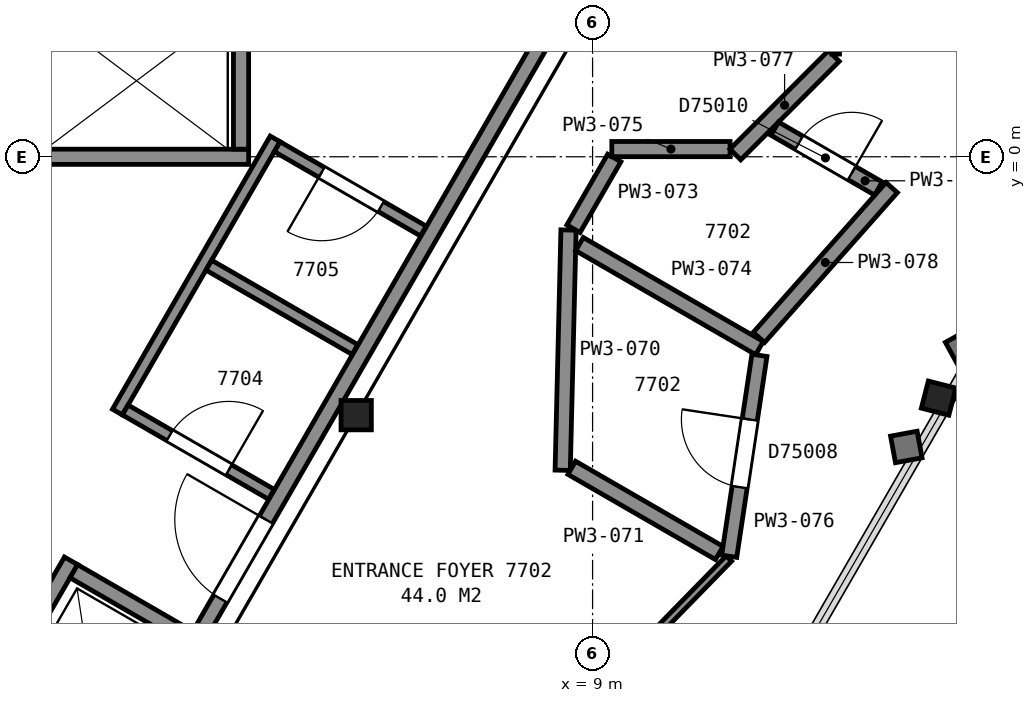
"""IFC4 building model, lengths in metres.
Left out: names, types, materials, properties, quantities, classifications, styles, units other than length and angle.
Written with IfcOpenShell. Run it as: python <this file> out.ifc"""

import sys

from ifc_helpers import new_model, si_unit, direction, frame, frame_2d, origin, origin_2d, place, context, subcontext, project, spatial, rectangle, i_section, extrude, element, fill, save


model = new_model("IFC4")
c1 = context("Model", 3, precision=1e-05, world=origin(), true_north=direction((0.0, 1.0)))
c2 = subcontext(c1, "Body", "Model", "MODEL_VIEW")
j1 = project(units=[si_unit("LENGTHUNIT", "METRE"), si_unit("PLANEANGLEUNIT", "RADIAN")], contexts=[c1])
p1 = place(None, origin())
s1 = spatial("IfcSite", under=j1, at=p1, CompositionType="ELEMENT")
p2 = place(p1, origin())
s2 = spatial("IfcBuilding", under=s1, at=p2, CompositionType="ELEMENT")
p3 = place(p2, frame((0.0, 0.0, 304.7)))
s3 = spatial("IfcBuildingStorey", under=s2, at=p3, CompositionType="ELEMENT", Elevation=304.7)
p4 = place(p3, frame((13.868, -3.257, 0.045), z_axis=(-0.262724220884, 0.067633911174, 0.96249760406), x_axis=(-0.498583237787, -0.86355528035, -0.075412417924)))
e1 = element("IfcColumn", 1, at=p4, inside=s3, PredefinedType="COLUMN", context=c2, shape_type="SweptSolid", body=[
    extrude(i_section(OverallWidth=0.373, OverallDepth=0.368, WebThickness=0.015, FlangeThickness=0.024, FilletRadius=0.015, at=origin_2d()), origin(), (0.0, 0.0, 1.0), 3.75),
])
p5 = place(p3, frame((5.89, -3.4, 0.0), z_axis=(0.0, 0.0, 1.0), x_axis=(1.0, 0.0, 0.0)))
e2 = element("IfcColumn", 2, at=p5, inside=s3, PredefinedType="COLUMN", context=c2, shape_type="SweptSolid", body=[
    extrude(i_section(OverallWidth=0.399, OverallDepth=0.386, WebThickness=0.021, FlangeThickness=0.033, FilletRadius=0.015, at=origin_2d()), origin(), (0.0, 0.0, 1.0), 3.7),
])
p6 = place(p3, frame((1.525, 0.0, 0.0), z_axis=(0.0, 0.0, 1.0), x_axis=(1.0, 0.0, 0.0)))
e3 = element("IfcWall", 3, at=p6, inside=s3, PredefinedType="PARTITIONING", context=c2, shape_type="SweptSolid", body=[
    extrude(rectangle(XDim=2.95, YDim=0.2, at=frame_2d((1.475, 0.0))), origin(), (0.0, 0.0, 1.0), 3.7),
])
p7 = place(p3, frame((0.863, -7.525, 0.0), z_axis=(0.0, 0.0, 1.0), x_axis=(0.499990435942, 0.866030925526, 0.0)))
e4 = element("IfcWall", 4, at=p7, inside=s3, PredefinedType="PARTITIONING", context=c2, shape_type="SweptSolid", body=[
    extrude(rectangle(XDim=2.55, YDim=0.2, at=frame_2d((1.275, 0.0))), origin(), (0.0, 0.0, 1.0), 3.7),
])
p8 = place(p7, frame((0.725, 0.0, 0.0)))
e5 = element("IfcOpeningElement", 5, at=p8, cuts=e4, PredefinedType="OPENING", context=c2, shape_type="SweptSolid", body=[
    extrude(rectangle(XDim=1.1, YDim=2.1, at=frame_2d((0.55, 1.05))), frame((0.0, 0.11, 0.0), z_axis=(0.0, -1.0, 0.0), x_axis=(1.0, 0.0, 0.0)), (0.0, 0.0, 1.0), 0.22),
])
p9 = place(p3, frame((4.375, 0.1, 0.0), z_axis=(0.0, 0.0, 1.0), x_axis=(0.0, 1.0, 0.0)))
e6 = element("IfcWall", 6, at=p9, inside=s3, PredefinedType="PARTITIONING", context=c2, shape_type="SweptSolid", body=[
    extrude(rectangle(XDim=1.95, YDim=0.2, at=frame_2d((0.975, 0.0))), origin(), (0.0, 0.0, 1.0), 3.7),
])
p10 = place(p3, frame((3.69, -6.328, 0.0), z_axis=(0.0, 0.0, 1.0), x_axis=(-0.866036909293, 0.499980071345, 0.0)))
e7 = element("IfcWall", 7, at=p10, inside=s3, PredefinedType="PARTITIONING", context=c2, shape_type="SweptSolid", body=[
    extrude(rectangle(XDim=1.75, YDim=0.2, at=frame_2d((0.875, 0.0))), origin(), (0.0, 0.0, 1.0), 3.7),
])
p11 = place(p3, frame((2.749, -3.359, 0.0), z_axis=(0.0, 0.0, 1.0), x_axis=(0.500017827812, 0.866015110648, 0.0)))
e8 = element("IfcWall", 8, at=p11, inside=s3, PredefinedType="PARTITIONING", context=c2, shape_type="SweptSolid", body=[
    extrude(rectangle(XDim=4.15, YDim=0.15, at=frame_2d((2.075, 0.0))), origin(), (0.0, 0.0, 1.0), 3.45),
])
p12 = place(p3, frame((2.851, -3.332, 0.0), z_axis=(0.0, 0.0, 1.0), x_axis=(0.866110524189, -0.499852538144, 0.0)))
e9 = element("IfcWall", 9, at=p12, inside=s3, PredefinedType="PARTITIONING", context=c2, shape_type="SweptSolid", body=[
    extrude(rectangle(XDim=2.22, YDim=0.15, at=frame_2d((1.11, 0.0))), origin(), (0.0, 0.0, 1.0), 3.45),
])
p13 = place(p12, frame((0.675, 0.0, 0.0)))
e10 = element("IfcOpeningElement", 10, at=p13, cuts=e9, PredefinedType="OPENING", context=c2, shape_type="SweptSolid", body=[
    extrude(rectangle(XDim=0.9, YDim=2.1, at=frame_2d((0.45, 1.05))), frame((0.0, 0.085, 0.0), z_axis=(0.0, -1.0, 0.0), x_axis=(1.0, 0.0, 0.0)), (0.0, 0.0, 1.0), 0.17),
])
p14 = place(p3, frame((3.828, -6.29, 0.0), z_axis=(0.0, 0.0, 1.0), x_axis=(0.499979739078, 0.866037101117, 0.0)))
e11 = element("IfcWall", 11, at=p14, inside=s3, PredefinedType="PARTITIONING", context=c2, shape_type="SweptSolid", body=[
    extrude(rectangle(XDim=11.363, YDim=0.2, at=frame_2d((5.681, 0.0))), origin(), (0.0, 0.0, 1.0), 3.45),
])
p15 = place(p14, frame((0.55, 0.0, 0.0)))
e12 = element("IfcOpeningElement", 12, at=p15, cuts=e11, PredefinedType="OPENING", context=c2, shape_type="SweptSolid", body=[
    extrude(rectangle(XDim=1.2, YDim=2.1, at=frame_2d((0.6, 1.05))), frame((0.0, 0.11, 0.0), z_axis=(0.0, -1.0, 0.0), x_axis=(1.0, 0.0, 0.0)), (0.0, 0.0, 1.0), 0.22),
])
p16 = place(p3, frame((3.951, -1.427, 0.0), z_axis=(0.0, 0.0, 1.0), x_axis=(0.866062920605, -0.499935013329, 0.0)))
e13 = element("IfcWall", 13, at=p16, inside=s3, PredefinedType="PARTITIONING", context=c2, shape_type="SweptSolid", body=[
    extrude(rectangle(XDim=2.22, YDim=0.15, at=frame_2d((1.11, 0.0))), origin(), (0.0, 0.0, 1.0), 3.45),
])
p17 = place(p3, frame((6.774, -0.978, 0.0), z_axis=(0.0, 0.0, 1.0), x_axis=(-0.866062920605, 0.499935013329, 0.0)))
e14 = element("IfcWall", 14, at=p17, inside=s3, PredefinedType="PARTITIONING", context=c2, shape_type="SweptSolid", body=[
    extrude(rectangle(XDim=2.22, YDim=0.15, at=frame_2d((1.11, 0.0))), origin(), (0.0, 0.0, 1.0), 3.45),
])
p18 = place(p17, frame((0.646, 0.0, 0.0)))
e15 = element("IfcOpeningElement", 15, at=p18, cuts=e14, PredefinedType="OPENING", context=c2, shape_type="SweptSolid", body=[
    extrude(rectangle(XDim=0.9, YDim=2.1, at=frame_2d((0.45, 1.05))), frame((0.0, 0.085, 0.0), z_axis=(0.0, -1.0, 0.0), x_axis=(1.0, 0.0, 0.0)), (0.0, 0.0, 1.0), 0.17),
])
p19 = place(p3, frame((7.682, -8.47, 0.0), z_axis=(0.0, 0.0, 1.0), x_axis=(0.698777378461, 0.715339203002, 0.0)))
e16 = element("IfcWall", 16, at=p19, inside=s3, PredefinedType="PARTITIONING", context=c2, shape_type="SweptSolid", body=[
    extrude(rectangle(XDim=4.452, YDim=0.1, at=frame_2d((2.226, 0.0))), origin(), (0.0, 0.0, 1.0), 2.723),
])
p20 = place(p3, frame((8.607, -4.125, 0.0), z_axis=(0.0, 0.0, 1.0), x_axis=(0.024245593124, 0.999706032399, 0.0)))
e17 = element("IfcWall", 17, at=p20, inside=s3, PredefinedType="PARTITIONING", context=c2, shape_type="SweptSolid", body=[
    extrude(rectangle(XDim=3.162, YDim=0.2, at=frame_2d((1.581, 0.0))), origin(), (0.0, 0.0, 1.0), 2.723),
])
p21 = place(p3, frame((8.726, -4.093, 0.0), z_axis=(0.0, 0.0, 1.0), x_axis=(0.866056839033, -0.499945548598, 0.0)))
e18 = element("IfcWall", 18, at=p21, inside=s3, PredefinedType="PARTITIONING", context=c2, shape_type="SweptSolid", body=[
    extrude(rectangle(XDim=2.242, YDim=0.2, at=frame_2d((1.121, 0.0))), origin(), (0.0, 0.0, 1.0), 2.723),
])
p22 = place(p3, frame((8.749, -0.947, 0.0), z_axis=(0.0, 0.0, 1.0), x_axis=(0.499656913366, 0.866223394354, 0.0)))
e19 = element("IfcWall", 19, at=p22, inside=s3, PredefinedType="PARTITIONING", context=c2, shape_type="SweptSolid", body=[
    extrude(rectangle(XDim=1.075, YDim=0.2, at=frame_2d((0.538, 0.0))), origin(), (0.0, 0.0, 1.0), 2.723),
])
p23 = place(p3, frame((8.828, -1.149, 0.0), z_axis=(0.0, 0.0, 1.0), x_axis=(0.865853899269, -0.50029693695, 0.0)))
e20 = element("IfcWall", 20, at=p23, inside=s3, PredefinedType="PARTITIONING", context=c2, shape_type="SweptSolid", body=[
    extrude(rectangle(XDim=2.734, YDim=0.2, at=frame_2d((1.367, 0.0))), origin(), (0.0, 0.0, 1.0), 2.723),
])
p24 = place(p3, frame((9.253, 0.101, 0.0), z_axis=(0.0, 0.0, 1.0), x_axis=(1.0, 0.0, 0.0)))
e21 = element("IfcWall", 21, at=p24, inside=s3, PredefinedType="PARTITIONING", context=c2, shape_type="SweptSolid", body=[
    extrude(rectangle(XDim=1.556, YDim=0.2, at=frame_2d((0.778, 0.0))), origin(), (0.0, 0.0, 1.0), 2.723),
])
p25 = place(p3, frame((10.797, -5.256, 0.0), z_axis=(0.0, 0.0, 1.0), x_axis=(0.148961207986, 0.988843040384, 0.0)))
e22 = element("IfcWall", 22, at=p25, inside=s3, PredefinedType="PARTITIONING", context=c2, shape_type="SweptSolid", body=[
    extrude(rectangle(XDim=2.673, YDim=0.2, at=frame_2d((1.336, 0.0))), origin(), (0.0, 0.0, 1.0), 2.723),
])
p26 = place(p25, frame((0.92, 0.0, 0.0)))
e23 = element("IfcOpeningElement", 23, at=p26, cuts=e22, PredefinedType="OPENING", context=c2, shape_type="SweptSolid", body=[
    extrude(rectangle(XDim=0.9, YDim=2.1, at=frame_2d((0.45, 1.05))), frame((0.0, 0.11, 0.0), z_axis=(0.0, -1.0, 0.0), x_axis=(1.0, 0.0, 0.0)), (0.0, 0.0, 1.0), 0.22),
])
p27 = place(p3, frame((10.878, 0.03, 0.0), z_axis=(0.0, 0.0, 1.0), x_axis=(0.707173379423, 0.707040176677, 0.0)))
e24 = element("IfcWall", 24, at=p27, inside=s3, PredefinedType="PARTITIONING", context=c2, shape_type="SweptSolid", body=[
    extrude(rectangle(XDim=1.833, YDim=0.2, at=frame_2d((0.917, 0.0))), origin(), (0.0, 0.0, 1.0), 2.723),
])
p28 = place(p3, frame((11.188, -2.377, 0.0), z_axis=(0.0, 0.0, 1.0), x_axis=(0.663045631266, 0.748578981043, 0.0)))
e25 = element("IfcWall", 25, at=p28, inside=s3, PredefinedType="PARTITIONING", context=c2, shape_type="SweptSolid", body=[
    extrude(rectangle(XDim=2.635, YDim=0.2, at=frame_2d((1.317, 0.0))), origin(), (0.0, 0.0, 1.0), 2.723),
])
p29 = place(p3, frame((12.761, -0.417, 0.0), z_axis=(0.0, 0.0, 1.0), x_axis=(-0.866030680601, 0.499990860175, 0.0)))
e26 = element("IfcWall", 26, at=p29, inside=s3, PredefinedType="PARTITIONING", context=c2, shape_type="SweptSolid", body=[
    extrude(rectangle(XDim=1.575, YDim=0.2, at=frame_2d((0.787, 0.0))), origin(), (0.0, 0.0, 1.0), 2.723),
])
p30 = place(p29, frame((0.405, 0.0, 0.0)))
e27 = element("IfcOpeningElement", 27, at=p30, cuts=e26, PredefinedType="OPENING", context=c2, shape_type="SweptSolid", body=[
    extrude(rectangle(XDim=0.8, YDim=2.1, at=frame_2d((0.4, 1.05))), frame((0.0, 0.11, 0.0), z_axis=(0.0, -1.0, 0.0), x_axis=(1.0, 0.0, 0.0)), (0.0, 0.0, 1.0), 0.22),
])
p31 = place(p3, frame((12.199, 3.682, 0.0), z_axis=(0.0, 0.0, 1.0), x_axis=(0.0, -1.0, 0.0)))
e28 = element("IfcWall", 28, at=p31, inside=s3, PredefinedType="PARTITIONING", context=c2, shape_type="SweptSolid", body=[
    extrude(rectangle(XDim=2.331, YDim=0.1, at=frame_2d((1.166, 0.0))), origin(), (0.0, 0.0, 1.0), 2.723),
])
p32 = place(p31, frame((0.631, 0.0, 0.0)))
e29 = element("IfcOpeningElement", 29, at=p32, cuts=e28, PredefinedType="OPENING", context=c2, shape_type="SweptSolid", body=[
    extrude(rectangle(XDim=1.0, YDim=2.1, at=frame_2d((0.5, 1.05))), frame((0.0, 0.06, 0.0), z_axis=(0.0, -1.0, 0.0), x_axis=(1.0, 0.0, 0.0)), (0.0, 0.0, 1.0), 0.12),
])
p33 = place(p13, origin())
e30 = element("IfcDoor", 30, at=p33, inside=s3, OperationType="SINGLE_SWING_RIGHT", PredefinedType="DOOR", context=c2, shape_type="SweptSolid", body=[
    extrude(rectangle(XDim=0.9, YDim=2.1, at=frame_2d((0.45, 1.05))), frame((0.0, 0.025, 0.0), z_axis=(0.0, -1.0, 0.0), x_axis=(1.0, 0.0, 0.0)), (0.0, 0.0, 1.0), 0.05),
])
fill(e10, e30)
p34 = place(p15, origin())
e31 = element("IfcDoor", 31, at=p34, inside=s3, OperationType="SINGLE_SWING_RIGHT", PredefinedType="DOOR", context=c2, shape_type="SweptSolid", body=[
    extrude(rectangle(XDim=1.2, YDim=2.1, at=frame_2d((0.6, 1.05))), frame((0.0, 0.025, 0.0), z_axis=(0.0, -1.0, 0.0), x_axis=(1.0, 0.0, 0.0)), (0.0, 0.0, 1.0), 0.05),
])
fill(e12, e31)
p35 = place(p18, origin())
e32 = element("IfcDoor", 32, at=p35, inside=s3, OperationType="SINGLE_SWING_RIGHT", PredefinedType="DOOR", context=c2, shape_type="SweptSolid", body=[
    extrude(rectangle(XDim=0.9, YDim=2.1, at=frame_2d((0.45, 1.05))), frame((0.0, 0.025, 0.0), z_axis=(0.0, -1.0, 0.0), x_axis=(1.0, 0.0, 0.0)), (0.0, 0.0, 1.0), 0.05),
])
fill(e15, e32)
p36 = place(p26, origin())
e33 = element("IfcDoor", 33, at=p36, inside=s3, OperationType="SINGLE_SWING_RIGHT", PredefinedType="DOOR", context=c2, shape_type="SweptSolid", body=[
    extrude(rectangle(XDim=0.9, YDim=2.1, at=frame_2d((0.45, 1.05))), frame((0.0, 0.025, 0.0), z_axis=(0.0, -1.0, 0.0), x_axis=(1.0, 0.0, 0.0)), (0.0, 0.0, 1.0), 0.05),
])
fill(e23, e33)
p37 = place(p30, origin())
e34 = element("IfcDoor", 34, at=p37, inside=s3, OperationType="SINGLE_SWING_LEFT", PredefinedType="DOOR", context=c2, shape_type="SweptSolid", body=[
    extrude(rectangle(XDim=0.8, YDim=2.1, at=frame_2d((0.4, 1.05))), frame((0.0, 0.025, 0.0), z_axis=(0.0, -1.0, 0.0), x_axis=(1.0, 0.0, 0.0)), (0.0, 0.0, 1.0), 0.05),
])
fill(e27, e34)
save(model, sys.argv[1])
